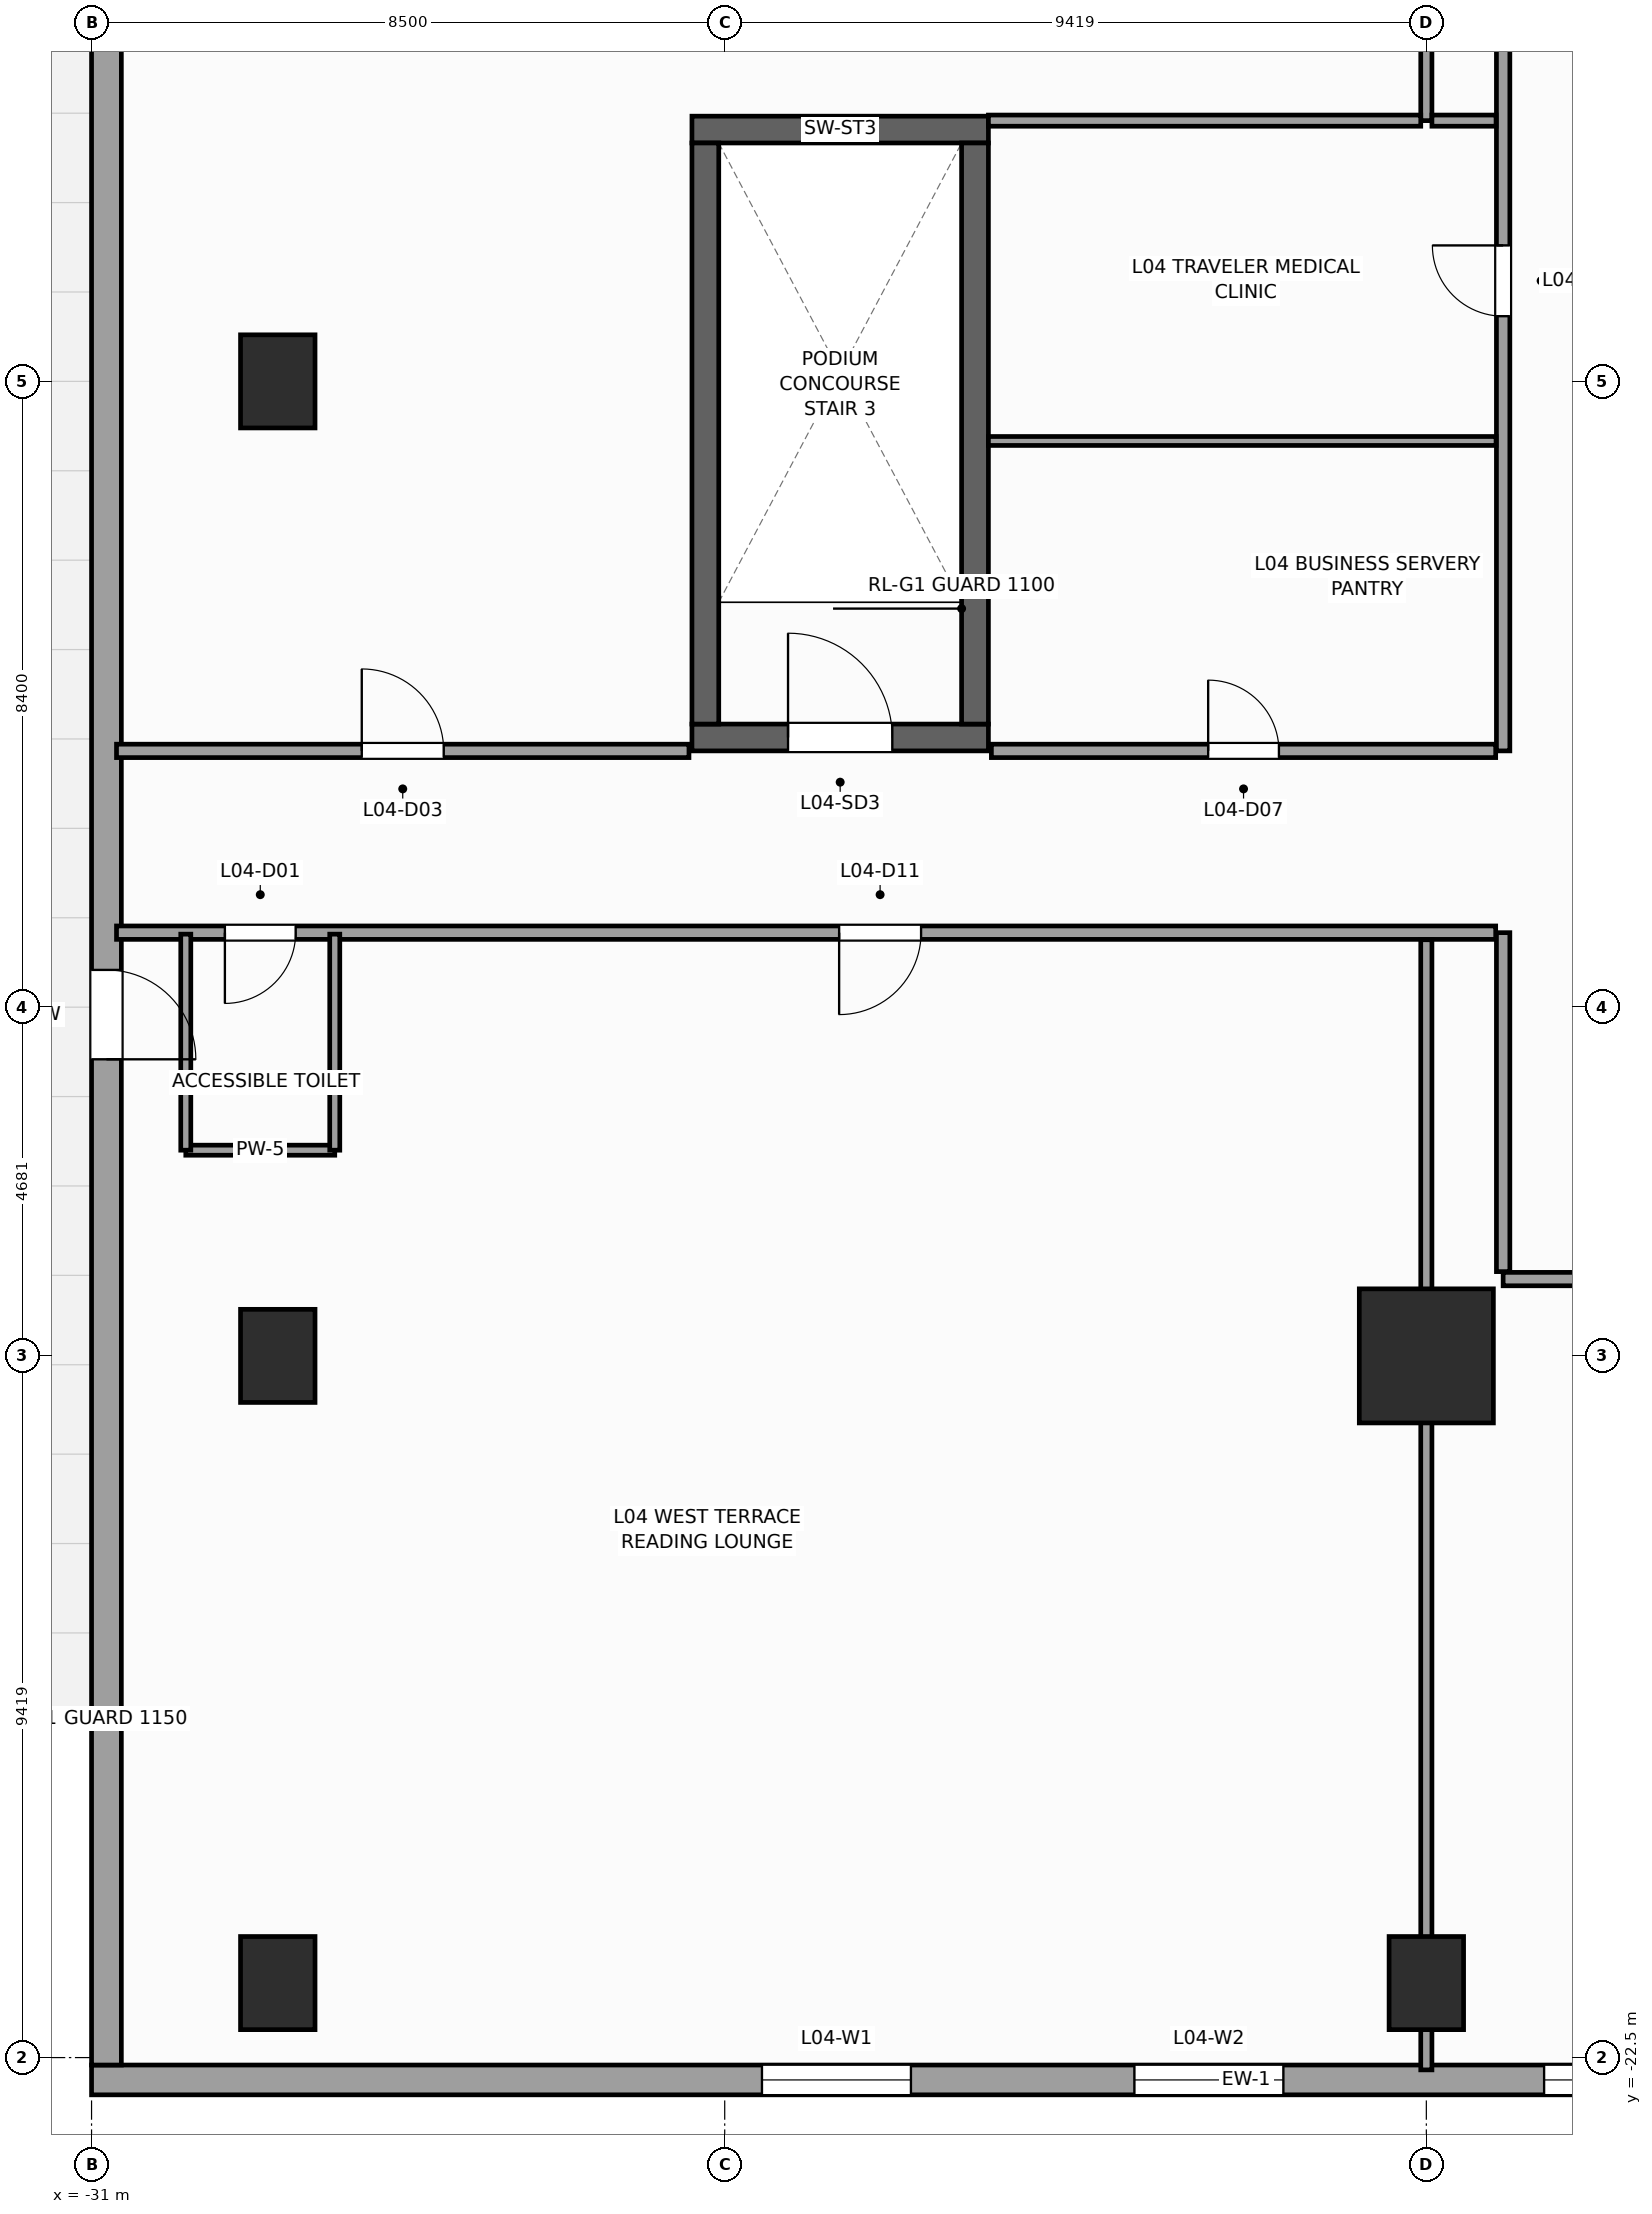
"""IFC4 building model, lengths in metres.
Left out: names, types, materials, properties, quantities, classifications, styles, units other than length and angle.
Written with IfcOpenShell. Run it as: python <this file> out.ifc"""

import sys

from ifc_helpers import new_model, si_unit, direction, frame, frame_2d, origin, origin_2d, place, context, subcontext, project, spatial, rectangle, extrude, source, transform, mapped, element, fill, save


model = new_model("IFC4")
c1 = context("Model", 3, precision=1e-05, world=origin(), true_north=direction((0.0, 1.0)))
c2 = subcontext(c1, "Body", "Model", "MODEL_VIEW")
j1 = project(units=[si_unit("LENGTHUNIT", "METRE"), si_unit("PLANEANGLEUNIT", "RADIAN")], contexts=[c1])
p1 = place(None, origin())
s1 = spatial("IfcSite", under=j1, at=p1, CompositionType="ELEMENT")
p2 = place(p1, origin())
s2 = spatial("IfcBuilding", under=s1, at=p2, CompositionType="ELEMENT")
p3 = place(p2, frame((0.0, 0.0, 21.0)))
s3 = spatial("IfcBuildingStorey", under=s2, at=p3, CompositionType="ELEMENT", Elevation=21.0)
p4 = place(p3, frame((-22.94, -4.78, 0.0), z_axis=(0.0, 0.0, 1.0), x_axis=(1.0, 0.0, 0.0)))
e1 = element("IfcWall", 1, at=p4, inside=s3, PredefinedType="SHEAR", context=c2, shape_type="SweptSolid", body=[
    extrude(rectangle(XDim=3.98, YDim=0.36, at=frame_2d((1.99, 0.0))), origin(), (0.0, 0.0, 1.0), 5.0),
])
p5 = place(p4, frame((1.29, 0.0, 0.0)))
e2 = element("IfcOpeningElement", 2, at=p5, cuts=e1, PredefinedType="OPENING", context=c2, shape_type="SweptSolid", body=[
    extrude(rectangle(XDim=1.4, YDim=2.2, at=frame_2d((0.7, 1.1))), frame((0.0, 0.19, 0.0), z_axis=(0.0, -1.0, 0.0), x_axis=(1.0, 0.0, 0.0)), (0.0, 0.0, 1.0), 0.38),
])
p6 = place(p3, frame((-22.94, 3.38, 0.0), z_axis=(0.0, 0.0, 1.0), x_axis=(1.0, 0.0, 0.0)))
e3 = element("IfcWall", 3, at=p6, inside=s3, PredefinedType="SHEAR", context=c2, shape_type="SweptSolid", body=[
    extrude(rectangle(XDim=3.98, YDim=0.36, at=frame_2d((1.99, 0.0))), origin(), (0.0, 0.0, 1.0), 5.0),
])
for number, where, z_axis, x_axis in (
    (4, (-22.76, -4.6, 0.0), (0.0, 0.0, 1.0), (0.0, 1.0, 0.0)),
    (5, (-19.14, -4.6, 0.0), (0.0, 0.0, 1.0), (0.0, 1.0, 0.0)),
):
    element("IfcWall", number, at=place(p3, frame(where, z_axis=z_axis, x_axis=x_axis)), inside=s3, PredefinedType="SHEAR", context=c2, shape_type="SweptSolid", body=[
        extrude(rectangle(XDim=7.8, YDim=0.36, at=frame_2d((3.9, 0.0))), origin(), (0.0, 0.0, 1.0), 5.0),
    ])
m1 = source(origin(), c2, "Body", "SweptSolid", [
    extrude(rectangle(XDim=1.8, YDim=1.8, at=origin_2d()), origin(), (0.0, 0.0, 1.0), 5.0),
])
p7 = place(p3, frame((-13.081, -13.081, 0.0), z_axis=(0.0, 0.0, 1.0), x_axis=(1.0, 0.0, 0.0)))
e6 = element("IfcColumn", 6, at=p7, inside=s3, PredefinedType="COLUMN", context=c2, shape_type="MappedRepresentation", body=[
    mapped(m1, transform((0.0, 0.0, 0.0), scale=1.0)),
])
m2 = source(origin(), c2, "Body", "SweptSolid", [
    extrude(rectangle(XDim=1.0, YDim=1.25, at=origin_2d()), origin(), (0.0, 0.0, 1.0), 5.0),
])
for number, where, z_axis, x_axis in (
    (7, (-28.5, -21.5, 0.0), (0.0, 0.0, 1.0), (1.0, 0.0, 0.0)),
    (8, (-13.081, -21.5, 0.0), (0.0, 0.0, 1.0), (1.0, 0.0, 0.0)),
    (9, (-28.5, -13.081, 0.0), (0.0, 0.0, 1.0), (1.0, 0.0, 0.0)),
    (10, (-28.5, 0.0, 0.0), (0.0, 0.0, 1.0), (1.0, 0.0, 0.0)),
):
    element("IfcColumn", number, at=place(p3, frame(where, z_axis=z_axis, x_axis=x_axis)), inside=s3, PredefinedType="COLUMN", context=c2, shape_type="MappedRepresentation", body=[
        mapped(m2, transform((0.0, 0.0, 0.0), scale=1.0)),
    ])
p8 = place(p3, frame((-31.0, -22.8, 0.0), z_axis=(0.0, 0.0, 1.0), x_axis=(1.0, 0.0, 0.0)))
e11 = element("IfcWall", 11, at=p8, inside=s3, PredefinedType="STANDARD", context=c2, shape_type="SweptSolid", body=[
    extrude(rectangle(XDim=31.0, YDim=0.4, at=frame_2d((15.5, 0.0))), origin(), (0.0, 0.0, 1.0), 4.72),
])
p9 = place(p8, frame((9.0, 0.0, 0.65)))
e12 = element("IfcOpeningElement", 12, at=p9, cuts=e11, PredefinedType="OPENING", context=c2, shape_type="SweptSolid", body=[
    extrude(rectangle(XDim=2.0, YDim=1.45, at=frame_2d((1.0, 0.725))), frame((0.0, 0.21, 0.0), z_axis=(0.0, -1.0, 0.0), x_axis=(1.0, 0.0, 0.0)), (0.0, 0.0, 1.0), 0.42),
])
p10 = place(p8, frame((14.0, 0.0, 0.65)))
e13 = element("IfcOpeningElement", 13, at=p10, cuts=e11, PredefinedType="OPENING", context=c2, shape_type="SweptSolid", body=[
    extrude(rectangle(XDim=2.0, YDim=1.45, at=frame_2d((1.0, 0.725))), frame((0.0, 0.21, 0.0), z_axis=(0.0, -1.0, 0.0), x_axis=(1.0, 0.0, 0.0)), (0.0, 0.0, 1.0), 0.42),
])
p11 = place(p8, frame((19.5, 0.0, 0.65)))
e14 = element("IfcOpeningElement", 14, at=p11, cuts=e11, PredefinedType="OPENING", context=c2, shape_type="SweptSolid", body=[
    extrude(rectangle(XDim=2.0, YDim=1.45, at=frame_2d((1.0, 0.725))), frame((0.0, 0.21, 0.0), z_axis=(0.0, -1.0, 0.0), x_axis=(1.0, 0.0, 0.0)), (0.0, 0.0, 1.0), 0.42),
])
p12 = place(p3, frame((-30.8, -22.6, 0.0), z_axis=(0.0, 0.0, 1.0), x_axis=(0.0, 1.0, 0.0)))
e15 = element("IfcWall", 15, at=p12, inside=s3, PredefinedType="STANDARD", context=c2, shape_type="SweptSolid", body=[
    extrude(rectangle(XDim=45.2, YDim=0.4, at=frame_2d((22.6, 0.0))), origin(), (0.0, 0.0, 1.0), 4.72),
])
p13 = place(p12, frame((13.5, 0.0, 0.0)))
e16 = element("IfcOpeningElement", 16, at=p13, cuts=e15, PredefinedType="OPENING", context=c2, shape_type="SweptSolid", body=[
    extrude(rectangle(XDim=1.2, YDim=2.3, at=frame_2d((0.6, 1.15))), frame((0.0, 0.21, 0.0), z_axis=(0.0, -1.0, 0.0), x_axis=(1.0, 0.0, 0.0)), (0.0, 0.0, 1.0), 0.42),
])
p14 = place(p3, frame((-12.05, -12.05, 0.0), z_axis=(0.0, 0.0, 1.0), x_axis=(1.0, 0.0, 0.0)))
e17 = element("IfcWall", 17, at=p14, inside=s3, PredefinedType="PARTITIONING", context=c2, shape_type="SweptSolid", body=[
    extrude(rectangle(XDim=13.75, YDim=0.18, at=frame_2d((6.875, 0.0))), origin(), (0.0, 0.0, 1.0), 4.72),
])
p15 = place(p14, frame((5.639, 0.0, 0.0)))
e18 = element("IfcOpeningElement", 18, at=p15, cuts=e17, PredefinedType="OPENING", context=c2, shape_type="SweptSolid", body=[
    extrude(rectangle(XDim=1.1, YDim=2.2, at=frame_2d((0.55, 1.1))), frame((0.0, 0.1, 0.0), z_axis=(0.0, -1.0, 0.0), x_axis=(1.0, 0.0, 0.0)), (0.0, 0.0, 1.0), 0.2),
])
p16 = place(p3, frame((-12.05, -11.95, 0.0), z_axis=(0.0, 0.0, 1.0), x_axis=(0.0, 1.0, 0.0)))
e19 = element("IfcWall", 19, at=p16, inside=s3, PredefinedType="PARTITIONING", context=c2, shape_type="SweptSolid", body=[
    extrude(rectangle(XDim=4.55, YDim=0.18, at=frame_2d((2.275, 0.0))), origin(), (0.0, 0.0, 1.0), 4.72),
])
p17 = place(p3, frame((-12.05, -4.96, 0.0), z_axis=(0.0, 0.0, 1.0), x_axis=(0.0, 1.0, 0.0)))
e20 = element("IfcWall", 20, at=p17, inside=s3, PredefinedType="PARTITIONING", context=c2, shape_type="SweptSolid", body=[
    extrude(rectangle(XDim=16.91, YDim=0.18, at=frame_2d((8.455, 0.0))), origin(), (0.0, 0.0, 1.0), 4.72),
])
p18 = place(p17, frame((5.835, 0.0, 0.0)))
e21 = element("IfcOpeningElement", 21, at=p18, cuts=e20, PredefinedType="OPENING", context=c2, shape_type="SweptSolid", body=[
    extrude(rectangle(XDim=0.95, YDim=2.15, at=frame_2d((0.475, 1.075))), frame((0.0, 0.1, 0.0), z_axis=(0.0, -1.0, 0.0), x_axis=(1.0, 0.0, 0.0)), (0.0, 0.0, 1.0), 0.2),
])
p19 = place(p3, frame((-30.665, -7.4, 0.0), z_axis=(0.0, 0.0, 1.0), x_axis=(1.0, 0.0, 0.0)))
e22 = element("IfcWall", 22, at=p19, inside=s3, PredefinedType="PARTITIONING", context=c2, shape_type="SweptSolid", body=[
    extrude(rectangle(XDim=18.515, YDim=0.18, at=frame_2d((9.258, 0.0))), origin(), (0.0, 0.0, 1.0), 4.72),
])
p20 = place(p19, frame((1.455, 0.0, 0.0)))
e23 = element("IfcOpeningElement", 23, at=p20, cuts=e22, PredefinedType="OPENING", context=c2, shape_type="SweptSolid", body=[
    extrude(rectangle(XDim=0.95, YDim=2.1, at=frame_2d((0.475, 1.05))), frame((0.0, 0.1, 0.0), z_axis=(0.0, -1.0, 0.0), x_axis=(1.0, 0.0, 0.0)), (0.0, 0.0, 1.0), 0.2),
])
p21 = place(p19, frame((9.701, 0.0, 0.0)))
e24 = element("IfcOpeningElement", 24, at=p21, cuts=e22, PredefinedType="OPENING", context=c2, shape_type="SweptSolid", body=[
    extrude(rectangle(XDim=1.1, YDim=2.2, at=frame_2d((0.55, 1.1))), frame((0.0, 0.1, 0.0), z_axis=(0.0, -1.0, 0.0), x_axis=(1.0, 0.0, 0.0)), (0.0, 0.0, 1.0), 0.2),
])
p22 = place(p3, frame((-30.665, -4.96, 0.0), z_axis=(0.0, 0.0, 1.0), x_axis=(1.0, 0.0, 0.0)))
e25 = element("IfcWall", 25, at=p22, inside=s3, PredefinedType="PARTITIONING", context=c2, shape_type="SweptSolid", body=[
    extrude(rectangle(XDim=7.685, YDim=0.18, at=frame_2d((3.843, 0.0))), origin(), (0.0, 0.0, 1.0), 4.72),
])
p23 = place(p22, frame((3.292, 0.0, 0.0)))
e26 = element("IfcOpeningElement", 26, at=p23, cuts=e25, PredefinedType="OPENING", context=c2, shape_type="SweptSolid", body=[
    extrude(rectangle(XDim=1.1, YDim=2.2, at=frame_2d((0.55, 1.1))), frame((0.0, 0.1, 0.0), z_axis=(0.0, -1.0, 0.0), x_axis=(1.0, 0.0, 0.0)), (0.0, 0.0, 1.0), 0.2),
])
p24 = place(p3, frame((-18.92, -4.96, 0.0), z_axis=(0.0, 0.0, 1.0), x_axis=(1.0, 0.0, 0.0)))
e27 = element("IfcWall", 27, at=p24, inside=s3, PredefinedType="PARTITIONING", context=c2, shape_type="SweptSolid", body=[
    extrude(rectangle(XDim=6.77, YDim=0.18, at=frame_2d((3.385, 0.0))), origin(), (0.0, 0.0, 1.0), 4.72),
])
p25 = place(p24, frame((2.91, 0.0, 0.0)))
e28 = element("IfcOpeningElement", 28, at=p25, cuts=e27, PredefinedType="OPENING", context=c2, shape_type="SweptSolid", body=[
    extrude(rectangle(XDim=0.95, YDim=2.15, at=frame_2d((0.475, 1.075))), frame((0.0, 0.1, 0.0), z_axis=(0.0, -1.0, 0.0), x_axis=(1.0, 0.0, 0.0)), (0.0, 0.0, 1.0), 0.2),
])
p26 = place(p3, frame((-13.081, 3.5, 0.0), z_axis=(0.0, 0.0, 1.0), x_axis=(0.0, 1.0, 0.0)))
e29 = element("IfcWall", 29, at=p26, inside=s3, PredefinedType="PARTITIONING", context=c2, shape_type="SweptSolid", body=[
    extrude(rectangle(XDim=19.165, YDim=0.15, at=frame_2d((9.583, 0.0))), origin(), (0.0, 0.0, 1.0), 2.88),
])
p27 = place(p3, frame((-18.96, 3.5, 0.0), z_axis=(0.0, 0.0, 1.0), x_axis=(1.0, 0.0, 0.0)))
e30 = element("IfcWall", 30, at=p27, inside=s3, PredefinedType="PARTITIONING", context=c2, shape_type="SweptSolid", body=[
    extrude(rectangle(XDim=5.804, YDim=0.15, at=frame_2d((2.902, 0.0))), origin(), (0.0, 0.0, 1.0), 4.72),
])
p28 = place(p3, frame((-13.006, 3.5, 0.0), z_axis=(0.0, 0.0, 1.0), x_axis=(1.0, 0.0, 0.0)))
e31 = element("IfcWall", 31, at=p28, inside=s3, PredefinedType="PARTITIONING", context=c2, shape_type="SweptSolid", body=[
    extrude(rectangle(XDim=0.861, YDim=0.15, at=frame_2d((0.431, 0.0))), origin(), (0.0, 0.0, 1.0), 4.72),
])
p29 = place(p3, frame((-18.96, -0.8, 0.0), z_axis=(0.0, 0.0, 1.0), x_axis=(1.0, 0.0, 0.0)))
e32 = element("IfcWall", 32, at=p29, inside=s3, PredefinedType="PARTITIONING", context=c2, shape_type="SweptSolid", body=[
    extrude(rectangle(XDim=6.815, YDim=0.12, at=frame_2d((3.407, 0.0))), origin(), (0.0, 0.0, 1.0), 2.75),
])
p30 = place(p3, frame((-13.081, -22.665, 0.0), z_axis=(0.0, 0.0, 1.0), x_axis=(0.0, 1.0, 0.0)))
e33 = element("IfcWall", 33, at=p30, inside=s3, PredefinedType="PARTITIONING", context=c2, shape_type="SweptSolid", body=[
    extrude(rectangle(XDim=15.17, YDim=0.15, at=frame_2d((7.585, 0.0))), origin(), (0.0, 0.0, 1.0), 2.88),
])
p31 = place(p3, frame((-29.735, -10.32, 0.0), z_axis=(0.0, 0.0, 1.0), x_axis=(1.0, 0.0, 0.0)))
e34 = element("IfcWall", 34, at=p31, inside=s3, PredefinedType="PARTITIONING", context=c2, shape_type="SweptSolid", body=[
    extrude(rectangle(XDim=2.0, YDim=0.135, at=frame_2d((1.0, 0.0))), origin(), (0.0, 0.0, 1.0), 4.72),
])
p32 = place(p3, frame((-27.735, -10.32, 0.0), z_axis=(0.0, 0.0, 1.0), x_axis=(0.0, 1.0, 0.0)))
e35 = element("IfcWall", 35, at=p32, inside=s3, PredefinedType="PARTITIONING", context=c2, shape_type="SweptSolid", body=[
    extrude(rectangle(XDim=2.9, YDim=0.135, at=frame_2d((1.45, 0.0))), origin(), (0.0, 0.0, 1.0), 2.75),
])
p33 = place(p3, frame((-29.735, -10.32, 0.0), z_axis=(0.0, 0.0, 1.0), x_axis=(0.0, 1.0, 0.0)))
e36 = element("IfcWall", 36, at=p33, inside=s3, PredefinedType="PARTITIONING", context=c2, shape_type="SweptSolid", body=[
    extrude(rectangle(XDim=2.9, YDim=0.135, at=frame_2d((1.45, 0.0))), origin(), (0.0, 0.0, 1.0), 4.72),
])
m3 = source(origin(), c2, "Body", "SweptSolid", [
    extrude(rectangle(XDim=2.0, YDim=1.45, at=frame_2d((1.0, 0.725))), frame((0.0, 0.03, 0.0), z_axis=(0.0, -1.0, 0.0), x_axis=(1.0, 0.0, 0.0)), (0.0, 0.0, 1.0), 0.06),
])
p34 = place(p9, origin())
e37 = element("IfcWindow", 37, at=p34, inside=s3, PartitioningType="SINGLE_PANEL", PredefinedType="WINDOW", context=c2, shape_type="MappedRepresentation", body=[
    mapped(m3, transform((0.0, 0.0, 0.0), scale=1.0)),
])
fill(e12, e37)
p35 = place(p10, origin())
e38 = element("IfcWindow", 38, at=p35, inside=s3, PartitioningType="SINGLE_PANEL", PredefinedType="WINDOW", context=c2, shape_type="MappedRepresentation", body=[
    mapped(m3, transform((0.0, 0.0, 0.0), scale=1.0)),
])
fill(e13, e38)
p36 = place(p11, origin())
e39 = element("IfcWindow", 39, at=p36, inside=s3, PartitioningType="SINGLE_PANEL", PredefinedType="WINDOW", context=c2, shape_type="MappedRepresentation", body=[
    mapped(m3, transform((0.0, 0.0, 0.0), scale=1.0)),
])
fill(e14, e39)
m4 = source(origin(), c2, "Body", "SweptSolid", [
    extrude(rectangle(XDim=1.2, YDim=2.3, at=frame_2d((0.6, 1.15))), frame((0.0, 0.025, 0.0), z_axis=(0.0, -1.0, 0.0), x_axis=(1.0, 0.0, 0.0)), (0.0, 0.0, 1.0), 0.05),
])
p37 = place(p13, frame((1.2, 0.0, 0.0), z_axis=(0.0, 0.0, 1.0), x_axis=(-1.0, 0.0, 0.0)))
e40 = element("IfcDoor", 40, at=p37, inside=s3, OperationType="SINGLE_SWING_LEFT", PredefinedType="DOOR", context=c2, shape_type="MappedRepresentation", body=[
    mapped(m4, transform((0.0, 0.0, 0.0), scale=1.0)),
])
fill(e16, e40)
m5 = source(origin(), c2, "Body", "SweptSolid", [
    extrude(rectangle(XDim=1.4, YDim=2.2, at=frame_2d((0.7, 1.1))), frame((0.0, 0.025, 0.0), z_axis=(0.0, -1.0, 0.0), x_axis=(1.0, 0.0, 0.0)), (0.0, 0.0, 1.0), 0.05),
])
p38 = place(p5, origin())
e41 = element("IfcDoor", 41, at=p38, inside=s3, OperationType="SINGLE_SWING_LEFT", PredefinedType="DOOR", context=c2, shape_type="MappedRepresentation", body=[
    mapped(m5, transform((0.0, 0.0, 0.0), scale=1.0)),
])
fill(e2, e41)
m6 = source(origin(), c2, "Body", "SweptSolid", [
    extrude(rectangle(XDim=0.95, YDim=2.1, at=frame_2d((0.475, 1.05))), frame((0.0, 0.025, 0.0), z_axis=(0.0, -1.0, 0.0), x_axis=(1.0, 0.0, 0.0)), (0.0, 0.0, 1.0), 0.05),
])
p39 = place(p20, frame((0.95, 0.0, 0.0), z_axis=(0.0, 0.0, 1.0), x_axis=(-1.0, 0.0, 0.0)))
e42 = element("IfcDoor", 42, at=p39, inside=s3, OperationType="SINGLE_SWING_LEFT", PredefinedType="DOOR", context=c2, shape_type="MappedRepresentation", body=[
    mapped(m6, transform((0.0, 0.0, 0.0), scale=1.0)),
])
fill(e23, e42)
m7 = source(origin(), c2, "Body", "SweptSolid", [
    extrude(rectangle(XDim=1.1, YDim=2.2, at=frame_2d((0.55, 1.1))), frame((0.0, 0.025, 0.0), z_axis=(0.0, -1.0, 0.0), x_axis=(1.0, 0.0, 0.0)), (0.0, 0.0, 1.0), 0.05),
])
p40 = place(p23, origin())
e43 = element("IfcDoor", 43, at=p40, inside=s3, OperationType="SINGLE_SWING_LEFT", PredefinedType="DOOR", context=c2, shape_type="MappedRepresentation", body=[
    mapped(m7, transform((0.0, 0.0, 0.0), scale=1.0)),
])
fill(e26, e43)
m8 = source(origin(), c2, "Body", "SweptSolid", [
    extrude(rectangle(XDim=0.95, YDim=2.15, at=frame_2d((0.475, 1.075))), frame((0.0, 0.025, 0.0), z_axis=(0.0, -1.0, 0.0), x_axis=(1.0, 0.0, 0.0)), (0.0, 0.0, 1.0), 0.05),
])
p41 = place(p25, origin())
e44 = element("IfcDoor", 44, at=p41, inside=s3, OperationType="SINGLE_SWING_LEFT", PredefinedType="DOOR", context=c2, shape_type="MappedRepresentation", body=[
    mapped(m8, transform((0.0, 0.0, 0.0), scale=1.0)),
])
fill(e28, e44)
p42 = place(p18, origin())
e45 = element("IfcDoor", 45, at=p42, inside=s3, OperationType="SINGLE_SWING_RIGHT", PredefinedType="DOOR", context=c2, shape_type="MappedRepresentation", body=[
    mapped(m8, transform((0.0, 0.0, 0.0), scale=1.0)),
])
fill(e21, e45)
p43 = place(p21, frame((1.1, 0.0, 0.0), z_axis=(0.0, 0.0, 1.0), x_axis=(-1.0, 0.0, 0.0)))
e46 = element("IfcDoor", 46, at=p43, inside=s3, OperationType="SINGLE_SWING_LEFT", PredefinedType="DOOR", context=c2, shape_type="MappedRepresentation", body=[
    mapped(m7, transform((0.0, 0.0, 0.0), scale=1.0)),
])
fill(e24, e46)
save(model, sys.argv[1])
